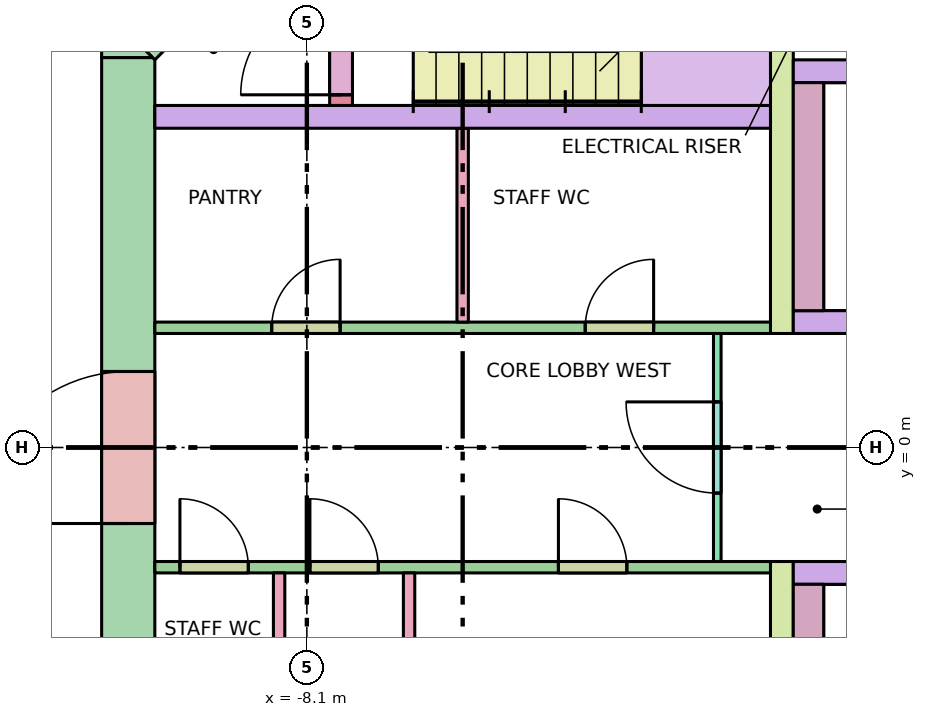
"""IFC4 building model, lengths in metres.
Left out: names, types, materials, properties, quantities, classifications, styles, units other than length and angle.
Written with IfcOpenShell. Run it as: python <this file> out.ifc"""

import sys

from ifc_helpers import new_model, si_unit, direction, frame, frame_2d, origin, place, context, subcontext, project, spatial, polyline, rectangle, outline, extrude, element, fill, save


model = new_model("IFC4")
c1 = context("Model", 3, precision=1e-05, world=origin(), true_north=direction((0.0, 1.0)))
c2 = subcontext(c1, "Body", "Model", "MODEL_VIEW")
j1 = project(units=[si_unit("LENGTHUNIT", "METRE"), si_unit("PLANEANGLEUNIT", "RADIAN")], contexts=[c1])
p1 = place(None, origin())
s1 = spatial("IfcSite", under=j1, at=p1, CompositionType="ELEMENT")
p2 = place(p1, origin())
s2 = spatial("IfcBuilding", under=s1, at=p2, CompositionType="ELEMENT")
p3 = place(p2, frame((0.0, 0.0, 237.2)))
s3 = spatial("IfcBuildingStorey", under=s2, at=p3, CompositionType="ELEMENT", Elevation=237.2)
p4 = place(p3, frame((-10.45, -5.13, -0.28), z_axis=(0.0, 0.0, 1.0), x_axis=(0.0, 1.0, 0.0)))
e1 = element("IfcWall", 1, at=p4, inside=s3, PredefinedType="SHEAR", context=c2, shape_type="SweptSolid", body=[
    extrude(rectangle(XDim=10.26, YDim=0.7, at=frame_2d((5.13, 0.0))), origin(), (0.0, 0.0, 1.0), 3.7),
])
p5 = place(p4, frame((4.13, 0.0, 0.28)))
e2 = element("IfcOpeningElement", 2, at=p5, cuts=e1, PredefinedType="OPENING", context=c2, shape_type="SweptSolid", body=[
    extrude(rectangle(XDim=2.0, YDim=2.1, at=frame_2d((1.0, 1.05))), frame((0.0, 0.36, 0.0), z_axis=(0.0, -1.0, 0.0), x_axis=(1.0, 0.0, 0.0)), (0.0, 0.0, 1.0), 0.72),
])
p6 = place(p3, frame((-10.347, 5.347, -0.28), z_axis=(0.0, 0.0, 1.0), x_axis=(0.707106781187, 0.707106781187, 0.0)))
e3 = element("IfcWall", 3, at=p6, inside=s3, PredefinedType="SHEAR", context=c2, shape_type="SweptSolid", body=[
    extrude(rectangle(XDim=4.243, YDim=0.7, at=frame_2d((2.121, 0.0))), origin(), (0.0, 0.0, 1.0), 3.7),
])
p7 = place(p6, frame((0.65, 0.0, 0.28)))
e4 = element("IfcOpeningElement", 4, at=p7, cuts=e3, PredefinedType="OPENING", context=c2, shape_type="SweptSolid", body=[
    extrude(rectangle(XDim=1.2, YDim=2.1, at=frame_2d((0.6, 1.05))), frame((0.0, 0.36, 0.0), z_axis=(0.0, -1.0, 0.0), x_axis=(1.0, 0.0, 0.0)), (0.0, 0.0, 1.0), 0.72),
])
p8 = place(p3, frame((0.0, 0.0, -0.28)))
e5 = element("IfcWall", 5, at=p8, inside=s3, PredefinedType="SHEAR", context=c2, shape_type="SweptSolid", body=[
    extrude(outline(polyline([(-10.595, 5.595), (-10.595, 5.595), (-10.595, 5.595), (-10.13, 5.13), (-10.8, 5.13), (-10.8, 5.13), (-10.8, 5.39), (-10.595, 5.595)])), origin(), (0.0, 0.0, 1.0), 3.7),
])
p9 = place(p3, frame((-10.1, 4.35, 0.0), z_axis=(0.0, 0.0, 1.0), x_axis=(1.0, 0.0, 0.0)))
e6 = element("IfcWall", 6, at=p9, inside=s3, PredefinedType="SOLIDWALL", context=c2, shape_type="SweptSolid", body=[
    extrude(rectangle(XDim=8.1, YDim=0.3, at=frame_2d((4.05, 0.0))), origin(), (0.0, 0.0, 1.0), 3.42),
])
for number, where, z_axis, x_axis in (
    (7, (-1.85, 1.5, 0.0), (0.0, 0.0, 1.0), (0.0, 1.0, 0.0)),
    (8, (-1.85, -8.1, 0.0), (0.0, 0.0, 1.0), (0.0, 1.0, 0.0)),
):
    element("IfcWall", number, at=place(p3, frame(where, z_axis=z_axis, x_axis=x_axis)), inside=s3, PredefinedType="SHEAR", context=c2, shape_type="SweptSolid", body=[
        extrude(rectangle(XDim=6.6, YDim=0.3, at=frame_2d((3.3, 0.0))), origin(), (0.0, 0.0, 1.0), 3.42),
    ])
p10 = place(p3, frame((-1.7, 1.65, 0.0), z_axis=(0.0, 0.0, 1.0), x_axis=(1.0, 0.0, 0.0)))
e9 = element("IfcWall", 9, at=p10, inside=s3, PredefinedType="SOLIDWALL", context=c2, shape_type="SweptSolid", body=[
    extrude(rectangle(XDim=3.4, YDim=0.3, at=frame_2d((1.7, 0.0))), origin(), (0.0, 0.0, 1.0), 3.42),
])
p11 = place(p10, frame((1.15, 0.0, 0.0)))
e10 = element("IfcOpeningElement", 10, at=p11, cuts=e9, PredefinedType="OPENING", context=c2, shape_type="SweptSolid", body=[
    extrude(rectangle(XDim=1.1, YDim=2.1, at=frame_2d((0.55, 1.05))), frame((0.0, 0.16, 0.0), z_axis=(0.0, -1.0, 0.0), x_axis=(1.0, 0.0, 0.0)), (0.0, 0.0, 1.0), 0.32),
])
p12 = place(p3, frame((-1.7, -1.65, 0.0), z_axis=(0.0, 0.0, 1.0), x_axis=(1.0, 0.0, 0.0)))
e11 = element("IfcWall", 11, at=p12, inside=s3, PredefinedType="SOLIDWALL", context=c2, shape_type="SweptSolid", body=[
    extrude(rectangle(XDim=3.4, YDim=0.3, at=frame_2d((1.7, 0.0))), origin(), (0.0, 0.0, 1.0), 3.42),
])
p13 = place(p12, frame((1.15, 0.0, 0.0)))
e12 = element("IfcOpeningElement", 12, at=p13, cuts=e11, PredefinedType="OPENING", context=c2, shape_type="SweptSolid", body=[
    extrude(rectangle(XDim=1.1, YDim=2.1, at=frame_2d((0.55, 1.05))), frame((0.0, 0.16, 0.0), z_axis=(0.0, -1.0, 0.0), x_axis=(1.0, 0.0, 0.0)), (0.0, 0.0, 1.0), 0.32),
])
for number, where, z_axis, x_axis in (
    (13, (-1.5, 1.8, 0.0), (0.0, 0.0, 1.0), (0.0, 1.0, 0.0)),
    (14, (-1.5, -4.8, 0.0), (0.0, 0.0, 1.0), (0.0, 1.0, 0.0)),
):
    element("IfcWall", number, at=place(p3, frame(where, z_axis=z_axis, x_axis=x_axis)), inside=s3, PredefinedType="SOLIDWALL", context=c2, shape_type="SweptSolid", body=[
        extrude(rectangle(XDim=3.0, YDim=0.4, at=frame_2d((1.5, 0.0))), origin(), (0.0, 0.0, 1.0), 3.42),
    ])
p14 = place(p3, frame((-1.7, 4.95, 0.0), z_axis=(0.0, 0.0, 1.0), x_axis=(1.0, 0.0, 0.0)))
e15 = element("IfcWall", 15, at=p14, inside=s3, PredefinedType="SOLIDWALL", context=c2, shape_type="SweptSolid", body=[
    extrude(rectangle(XDim=3.4, YDim=0.3, at=frame_2d((1.7, 0.0))), origin(), (0.0, 0.0, 1.0), 3.42),
])
p15 = place(p3, frame((-7.65, 4.5, 0.0), z_axis=(0.0, 0.0, 1.0), x_axis=(0.0, 1.0, 0.0)))
e16 = element("IfcWall", 16, at=p15, inside=s3, PredefinedType="SHEAR", context=c2, shape_type="SweptSolid", body=[
    extrude(rectangle(XDim=3.14, YDim=0.3, at=frame_2d((1.57, 0.0))), origin(), (0.0, 0.0, 1.0), 3.42),
])
p16 = place(p15, frame((0.14, 0.0, 0.0)))
e17 = element("IfcOpeningElement", 17, at=p16, cuts=e16, PredefinedType="OPENING", context=c2, shape_type="SweptSolid", body=[
    extrude(rectangle(XDim=1.32, YDim=2.1, at=frame_2d((0.66, 1.05))), frame((0.0, 0.16, 0.0), z_axis=(0.0, -1.0, 0.0), x_axis=(1.0, 0.0, 0.0)), (0.0, 0.0, 1.0), 0.32),
])
p17 = place(p3, frame((-2.7, -1.5, 0.0), z_axis=(0.0, 0.0, 1.0), x_axis=(0.0, 1.0, 0.0)))
e18 = element("IfcWall", 18, at=p17, inside=s3, PredefinedType="PARTITIONING", context=c2, shape_type="SweptSolid", body=[
    extrude(rectangle(XDim=3.0, YDim=0.1, at=frame_2d((1.5, 0.0))), origin(), (0.0, 0.0, 1.0), 3.42),
])
p18 = place(p17, frame((0.9, 0.0, 0.0)))
e19 = element("IfcOpeningElement", 19, at=p18, cuts=e18, PredefinedType="OPENING", context=c2, shape_type="SweptSolid", body=[
    extrude(rectangle(XDim=1.2, YDim=2.1, at=frame_2d((0.6, 1.05))), frame((0.0, 0.06, 0.0), z_axis=(0.0, -1.0, 0.0), x_axis=(1.0, 0.0, 0.0)), (0.0, 0.0, 1.0), 0.12),
])
for number, where, z_axis, x_axis in (
    (20, (-6.05, 1.65, 0.0), (0.0, 0.0, 1.0), (0.0, 1.0, 0.0)),
    (21, (-8.465, -4.2, 0.0), (0.0, 0.0, 1.0), (0.0, 1.0, 0.0)),
    (22, (-6.755, -4.2, 0.0), (0.0, 0.0, 1.0), (0.0, 1.0, 0.0)),
):
    element("IfcWall", number, at=place(p3, frame(where, z_axis=z_axis, x_axis=x_axis)), inside=s3, PredefinedType="PARTITIONING", context=c2, shape_type="SweptSolid", body=[
        extrude(rectangle(XDim=2.55, YDim=0.15, at=frame_2d((1.275, 0.0))), origin(), (0.0, 0.0, 1.0), 3.42),
    ])
p19 = place(p3, frame((-10.1, 1.575, 0.0), z_axis=(0.0, 0.0, 1.0), x_axis=(1.0, 0.0, 0.0)))
e23 = element("IfcWall", 23, at=p19, inside=s3, PredefinedType="PARTITIONING", context=c2, shape_type="SweptSolid", body=[
    extrude(rectangle(XDim=8.1, YDim=0.15, at=frame_2d((4.05, 0.0))), origin(), (0.0, 0.0, 1.0), 3.42),
])
p20 = place(p19, frame((1.538, 0.0, 0.0)))
e24 = element("IfcOpeningElement", 24, at=p20, cuts=e23, PredefinedType="OPENING", context=c2, shape_type="SweptSolid", body=[
    extrude(rectangle(XDim=0.9, YDim=2.1, at=frame_2d((0.45, 1.05))), frame((0.0, 0.085, 0.0), z_axis=(0.0, -1.0, 0.0), x_axis=(1.0, 0.0, 0.0)), (0.0, 0.0, 1.0), 0.17),
])
p21 = place(p19, frame((5.663, 0.0, 0.0)))
e25 = element("IfcOpeningElement", 25, at=p21, cuts=e23, PredefinedType="OPENING", context=c2, shape_type="SweptSolid", body=[
    extrude(rectangle(XDim=0.9, YDim=2.1, at=frame_2d((0.45, 1.05))), frame((0.0, 0.085, 0.0), z_axis=(0.0, -1.0, 0.0), x_axis=(1.0, 0.0, 0.0)), (0.0, 0.0, 1.0), 0.17),
])
p22 = place(p3, frame((-10.1, -1.575, 0.0), z_axis=(0.0, 0.0, 1.0), x_axis=(1.0, 0.0, 0.0)))
e26 = element("IfcWall", 26, at=p22, inside=s3, PredefinedType="PARTITIONING", context=c2, shape_type="SweptSolid", body=[
    extrude(rectangle(XDim=8.1, YDim=0.15, at=frame_2d((4.05, 0.0))), origin(), (0.0, 0.0, 1.0), 3.42),
])
p23 = place(p22, frame((0.33, 0.0, 0.0)))
e27 = element("IfcOpeningElement", 27, at=p23, cuts=e26, PredefinedType="OPENING", context=c2, shape_type="SweptSolid", body=[
    extrude(rectangle(XDim=0.9, YDim=2.1, at=frame_2d((0.45, 1.05))), frame((0.0, 0.085, 0.0), z_axis=(0.0, -1.0, 0.0), x_axis=(1.0, 0.0, 0.0)), (0.0, 0.0, 1.0), 0.17),
])
p24 = place(p22, frame((2.04, 0.0, 0.0)))
e28 = element("IfcOpeningElement", 28, at=p24, cuts=e26, PredefinedType="OPENING", context=c2, shape_type="SweptSolid", body=[
    extrude(rectangle(XDim=0.9, YDim=2.1, at=frame_2d((0.45, 1.05))), frame((0.0, 0.085, 0.0), z_axis=(0.0, -1.0, 0.0), x_axis=(1.0, 0.0, 0.0)), (0.0, 0.0, 1.0), 0.17),
])
p25 = place(p22, frame((5.31, 0.0, 0.0)))
e29 = element("IfcOpeningElement", 29, at=p25, cuts=e26, PredefinedType="OPENING", context=c2, shape_type="SweptSolid", body=[
    extrude(rectangle(XDim=0.9, YDim=2.1, at=frame_2d((0.45, 1.05))), frame((0.0, 0.085, 0.0), z_axis=(0.0, -1.0, 0.0), x_axis=(1.0, 0.0, 0.0)), (0.0, 0.0, 1.0), 0.17),
])
p26 = place(p16, origin())
e30 = element("IfcDoor", 30, at=p26, inside=s3, OperationType="DOUBLE_DOOR_SINGLE_SWING", PredefinedType="DOOR", context=c2, shape_type="SweptSolid", body=[
    extrude(rectangle(XDim=1.32, YDim=2.1, at=frame_2d((0.66, 1.05))), frame((0.0, 0.025, 0.0), z_axis=(0.0, -1.0, 0.0), x_axis=(1.0, 0.0, 0.0)), (0.0, 0.0, 1.0), 0.05),
])
fill(e17, e30)
p27 = place(p5, origin())
e31 = element("IfcDoor", 31, at=p27, inside=s3, OperationType="DOUBLE_DOOR_SINGLE_SWING", PredefinedType="DOOR", context=c2, shape_type="SweptSolid", body=[
    extrude(rectangle(XDim=2.0, YDim=2.1, at=frame_2d((1.0, 1.05))), frame((0.0, 0.025, 0.0), z_axis=(0.0, -1.0, 0.0), x_axis=(1.0, 0.0, 0.0)), (0.0, 0.0, 1.0), 0.05),
])
fill(e2, e31)
p28 = place(p18, origin())
e32 = element("IfcDoor", 32, at=p28, inside=s3, OperationType="SINGLE_SWING_RIGHT", PredefinedType="DOOR", context=c2, shape_type="SweptSolid", body=[
    extrude(rectangle(XDim=1.2, YDim=2.1, at=frame_2d((0.6, 1.05))), frame((0.0, 0.025, 0.0), z_axis=(0.0, -1.0, 0.0), x_axis=(1.0, 0.0, 0.0)), (0.0, 0.0, 1.0), 0.05),
])
fill(e19, e32)
p29 = place(p20, origin())
e33 = element("IfcDoor", 33, at=p29, inside=s3, OperationType="SINGLE_SWING_RIGHT", PredefinedType="DOOR", context=c2, shape_type="SweptSolid", body=[
    extrude(rectangle(XDim=0.9, YDim=2.1, at=frame_2d((0.45, 1.05))), frame((0.0, 0.025, 0.0), z_axis=(0.0, -1.0, 0.0), x_axis=(1.0, 0.0, 0.0)), (0.0, 0.0, 1.0), 0.05),
])
fill(e24, e33)
p30 = place(p21, origin())
e34 = element("IfcDoor", 34, at=p30, inside=s3, OperationType="SINGLE_SWING_RIGHT", PredefinedType="DOOR", context=c2, shape_type="SweptSolid", body=[
    extrude(rectangle(XDim=0.9, YDim=2.1, at=frame_2d((0.45, 1.05))), frame((0.0, 0.025, 0.0), z_axis=(0.0, -1.0, 0.0), x_axis=(1.0, 0.0, 0.0)), (0.0, 0.0, 1.0), 0.05),
])
fill(e25, e34)
p31 = place(p23, origin())
e35 = element("IfcDoor", 35, at=p31, inside=s3, OperationType="SINGLE_SWING_LEFT", PredefinedType="DOOR", context=c2, shape_type="SweptSolid", body=[
    extrude(rectangle(XDim=0.9, YDim=2.1, at=frame_2d((0.45, 1.05))), frame((0.0, 0.025, 0.0), z_axis=(0.0, -1.0, 0.0), x_axis=(1.0, 0.0, 0.0)), (0.0, 0.0, 1.0), 0.05),
])
fill(e27, e35)
p32 = place(p24, origin())
e36 = element("IfcDoor", 36, at=p32, inside=s3, OperationType="SINGLE_SWING_LEFT", PredefinedType="DOOR", context=c2, shape_type="SweptSolid", body=[
    extrude(rectangle(XDim=0.9, YDim=2.1, at=frame_2d((0.45, 1.05))), frame((0.0, 0.025, 0.0), z_axis=(0.0, -1.0, 0.0), x_axis=(1.0, 0.0, 0.0)), (0.0, 0.0, 1.0), 0.05),
])
fill(e28, e36)
p33 = place(p25, origin())
e37 = element("IfcDoor", 37, at=p33, inside=s3, OperationType="SINGLE_SWING_LEFT", PredefinedType="DOOR", context=c2, shape_type="SweptSolid", body=[
    extrude(rectangle(XDim=0.9, YDim=2.1, at=frame_2d((0.45, 1.05))), frame((0.0, 0.025, 0.0), z_axis=(0.0, -1.0, 0.0), x_axis=(1.0, 0.0, 0.0)), (0.0, 0.0, 1.0), 0.05),
])
fill(e29, e37)
save(model, sys.argv[1])
